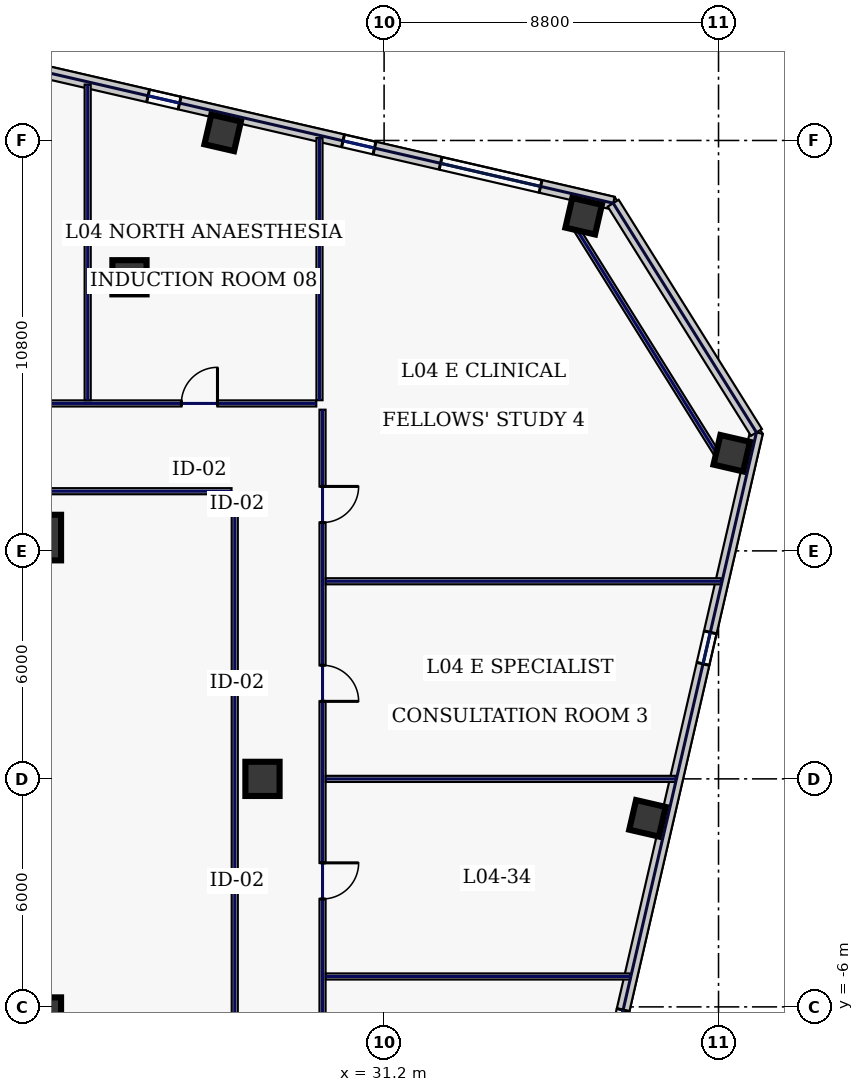
"""IFC4 building model, lengths in metres.
Left out: names, types, materials, properties, quantities, classifications, styles, units other than length and angle.
Written with IfcOpenShell. Run it as: python <this file> out.ifc"""

import sys

from ifc_helpers import new_model, si_unit, direction, frame, frame_2d, origin, origin_2d, place, context, subcontext, project, spatial, rectangle, hollow_rectangle, extrude, element, fill, save


model = new_model("IFC4")
c1 = context("Model", 3, precision=1e-05, world=origin(), true_north=direction((0.0, 1.0)))
c2 = subcontext(c1, "Body", "Model", "MODEL_VIEW")
j1 = project(units=[si_unit("LENGTHUNIT", "METRE"), si_unit("PLANEANGLEUNIT", "RADIAN")], contexts=[c1])
p1 = place(None, origin())
s1 = spatial("IfcSite", under=j1, at=p1, CompositionType="ELEMENT")
p2 = place(p1, origin())
s2 = spatial("IfcBuilding", under=s1, at=p2, CompositionType="ELEMENT")
p3 = place(p2, frame((0.0, 0.0, 23.4)))
s3 = spatial("IfcBuildingStorey", under=s2, at=p3, CompositionType="ELEMENT", Elevation=23.4)
for number, where, z_axis, x_axis in (
    (1, (22.1, -6.35, 0.0), (0.0, 0.0, 1.0), (1.0, 0.0, 0.0)),
    (2, (22.1, 6.35, 0.0), (0.0, 0.0, 1.0), (1.0, 0.0, 0.0)),
):
    element("IfcColumn", number, at=place(p3, frame(where, z_axis=z_axis, x_axis=x_axis)), inside=s3, PredefinedType="COLUMN", context=c2, shape_type="SweptSolid", body=[
        extrude(hollow_rectangle(XDim=1.2, YDim=1.2, WallThickness=0.05, at=origin_2d()), origin(), (0.0, 0.0, 1.0), 4.7),
    ])
for number, where, z_axis, x_axis in (
    (3, (24.5, 13.2, 0.0), (0.0, 0.0, 1.0), (1.0, 0.0, 0.0)),
    (4, (28.0, 0.0, 0.0), (0.0, 0.0, 1.0), (1.0, 0.0, 0.0)),
):
    element("IfcColumn", number, at=place(p3, frame(where, z_axis=z_axis, x_axis=x_axis)), inside=s3, PredefinedType="COLUMN", context=c2, shape_type="SweptSolid", body=[
        extrude(hollow_rectangle(XDim=0.9, YDim=0.9, WallThickness=0.04, at=origin_2d()), origin(), (0.0, 0.0, 1.0), 4.7),
    ])
for number, where, z_axis, x_axis in (
    (5, (36.451, 14.806, 0.0), (0.0, 0.0, 1.0), (0.974, -0.225, 0.0)),
    (6, (26.952, 16.999, 0.0), (0.0, 0.0, 1.0), (0.974, -0.225, 0.0)),
    (7, (38.13, -1.038, 0.0), (0.0, 0.0, 1.0), (0.974, -0.225, 0.0)),
    (8, (40.348, 8.57, 0.0), (0.0, 0.0, 1.0), (0.974, -0.225, 0.0)),
):
    element("IfcColumn", number, at=place(p3, frame(where, z_axis=z_axis, x_axis=x_axis)), inside=s3, PredefinedType="COLUMN", context=c2, shape_type="SweptSolid", body=[
        extrude(hollow_rectangle(XDim=0.8, YDim=0.8, WallThickness=0.036, at=origin_2d()), origin(), (0.0, 0.0, 1.0), 4.7),
    ])
p4 = place(p3, frame((37.229, 15.15, 0.0), z_axis=(0.0, 0.0, 1.0), x_axis=(-0.97436993772, 0.224951604723, 0.0)))
e9 = element("IfcWall", 9, at=p4, inside=s3, PredefinedType="STANDARD", context=c2, shape_type="SweptSolid", body=[
    extrude(rectangle(XDim=22.651, YDim=0.34, at=frame_2d((11.326, 0.0))), origin(), (0.0, 0.0, 1.0), 4.7),
])
p5 = place(p4, frame((16.195, 0.0, 0.9)))
e10 = element("IfcOpeningElement", 10, at=p5, cuts=e9, PredefinedType="OPENING", context=c2, shape_type="SweptSolid", body=[
    extrude(rectangle(XDim=2.7, YDim=2.2, at=frame_2d((1.35, 1.1))), frame((0.0, 0.18, 0.0), z_axis=(0.0, -1.0, 0.0), x_axis=(1.0, 0.0, 0.0)), (0.0, 0.0, 1.0), 0.36),
])
p6 = place(p4, frame((11.711, 0.0, 0.9)))
e11 = element("IfcOpeningElement", 11, at=p6, cuts=e9, PredefinedType="OPENING", context=c2, shape_type="SweptSolid", body=[
    extrude(rectangle(XDim=0.85, YDim=1.85, at=frame_2d((0.425, 0.925))), frame((0.0, 0.18, 0.0), z_axis=(0.0, -1.0, 0.0), x_axis=(1.0, 0.0, 0.0)), (0.0, 0.0, 1.0), 0.36),
])
p7 = place(p4, frame((6.447, 0.0, 0.9)))
e12 = element("IfcOpeningElement", 12, at=p7, cuts=e9, PredefinedType="OPENING", context=c2, shape_type="SweptSolid", body=[
    extrude(rectangle(XDim=0.85, YDim=1.85, at=frame_2d((0.425, 0.925))), frame((0.0, 0.18, 0.0), z_axis=(0.0, -1.0, 0.0), x_axis=(1.0, 0.0, 0.0)), (0.0, 0.0, 1.0), 0.36),
])
p8 = place(p4, frame((1.962, 0.0, 0.9)))
e13 = element("IfcOpeningElement", 13, at=p8, cuts=e9, PredefinedType="OPENING", context=c2, shape_type="SweptSolid", body=[
    extrude(rectangle(XDim=2.7, YDim=2.2, at=frame_2d((1.35, 1.1))), frame((0.0, 0.18, 0.0), z_axis=(0.0, -1.0, 0.0), x_axis=(1.0, 0.0, 0.0)), (0.0, 0.0, 1.0), 0.36),
])
p9 = place(p3, frame((31.82, -30.637, 0.0), z_axis=(0.0, 0.0, 1.0), x_axis=(0.224949969076, 0.974370315338, 0.0)))
e14 = element("IfcWall", 14, at=p9, inside=s3, PredefinedType="STANDARD", context=c2, shape_type="SweptSolid", body=[
    extrude(rectangle(XDim=40.8, YDim=0.34, at=frame_2d((20.4, 0.0))), origin(), (0.0, 0.0, 1.0), 4.7),
])
p10 = place(p9, frame((4.3, 0.0, 0.58)))
e15 = element("IfcOpeningElement", 15, at=p10, cuts=e14, PredefinedType="OPENING", context=c2, shape_type="SweptSolid", body=[
    extrude(rectangle(XDim=1.6, YDim=2.3, at=frame_2d((0.8, 1.15))), frame((0.0, 0.18, 0.0), z_axis=(0.0, -1.0, 0.0), x_axis=(1.0, 0.0, 0.0)), (0.0, 0.0, 1.0), 0.36),
])
p11 = place(p9, frame((14.5, 0.0, 0.58)))
e16 = element("IfcOpeningElement", 16, at=p11, cuts=e14, PredefinedType="OPENING", context=c2, shape_type="SweptSolid", body=[
    extrude(rectangle(XDim=1.6, YDim=2.3, at=frame_2d((0.8, 1.15))), frame((0.0, 0.18, 0.0), z_axis=(0.0, -1.0, 0.0), x_axis=(1.0, 0.0, 0.0)), (0.0, 0.0, 1.0), 0.36),
])
p12 = place(p9, frame((24.35, 0.0, 0.75)))
e17 = element("IfcOpeningElement", 17, at=p12, cuts=e14, PredefinedType="OPENING", context=c2, shape_type="SweptSolid", body=[
    extrude(rectangle(XDim=0.85, YDim=1.85, at=frame_2d((0.425, 0.925))), frame((0.0, 0.18, 0.0), z_axis=(0.0, -1.0, 0.0), x_axis=(1.0, 0.0, 0.0)), (0.0, 0.0, 1.0), 0.36),
])
p13 = place(p9, frame((34.55, 0.0, 0.75)))
e18 = element("IfcOpeningElement", 18, at=p13, cuts=e14, PredefinedType="OPENING", context=c2, shape_type="SweptSolid", body=[
    extrude(rectangle(XDim=0.85, YDim=1.85, at=frame_2d((0.425, 0.925))), frame((0.0, 0.18, 0.0), z_axis=(0.0, -1.0, 0.0), x_axis=(1.0, 0.0, 0.0)), (0.0, 0.0, 1.0), 0.36),
])
p14 = place(p3, frame((40.998, 9.117, 0.0), z_axis=(0.0, 0.0, 1.0), x_axis=(-0.529921811158, 0.848046504656, 0.0)))
e19 = element("IfcWall", 19, at=p14, inside=s3, PredefinedType="STANDARD", context=c2, shape_type="SweptSolid", body=[
    extrude(rectangle(XDim=7.113, YDim=0.34, at=frame_2d((3.557, 0.0))), origin(), (0.0, 0.0, 1.0), 4.7),
])
p15 = place(p3, frame((40.06, 8.389, 0.0), z_axis=(0.0, 0.0, 1.0), x_axis=(-0.529927317139, 0.848043064089, 0.0)))
e20 = element("IfcWall", 20, at=p15, inside=s3, PredefinedType="PARTITIONING", context=c2, shape_type="SweptSolid", body=[
    extrude(rectangle(XDim=7.354, YDim=0.16, at=frame_2d((3.677, 0.0))), origin(), (0.0, 0.0, 1.0), 4.7),
])
p16 = place(p3, frame((-29.415, 9.88, 0.0), z_axis=(0.0, 0.0, 1.0), x_axis=(1.0, 0.0, 0.0)))
e21 = element("IfcWall", 21, at=p16, inside=s3, PredefinedType="PARTITIONING", context=c2, shape_type="SweptSolid", body=[
    extrude(rectangle(XDim=58.83, YDim=0.16, at=frame_2d((29.415, 0.0))), origin(), (0.0, 0.0, 1.0), 4.7),
])
p17 = place(p16, frame((2.044, 0.0, 0.0)))
e22 = element("IfcOpeningElement", 22, at=p17, cuts=e21, PredefinedType="OPENING", context=c2, shape_type="SweptSolid", body=[
    extrude(rectangle(XDim=0.95, YDim=2.2, at=frame_2d((0.475, 1.1))), frame((0.0, 0.09, 0.0), z_axis=(0.0, -1.0, 0.0), x_axis=(1.0, 0.0, 0.0)), (0.0, 0.0, 1.0), 0.18),
])
p18 = place(p16, frame((7.5, 0.0, 0.0)))
e23 = element("IfcOpeningElement", 23, at=p18, cuts=e21, PredefinedType="OPENING", context=c2, shape_type="SweptSolid", body=[
    extrude(rectangle(XDim=0.95, YDim=2.2, at=frame_2d((0.475, 1.1))), frame((0.0, 0.09, 0.0), z_axis=(0.0, -1.0, 0.0), x_axis=(1.0, 0.0, 0.0)), (0.0, 0.0, 1.0), 0.18),
])
p19 = place(p16, frame((14.725, 0.0, 0.0)))
e24 = element("IfcOpeningElement", 24, at=p19, cuts=e21, PredefinedType="OPENING", context=c2, shape_type="SweptSolid", body=[
    extrude(rectangle(XDim=0.95, YDim=2.2, at=frame_2d((0.475, 1.1))), frame((0.0, 0.09, 0.0), z_axis=(0.0, -1.0, 0.0), x_axis=(1.0, 0.0, 0.0)), (0.0, 0.0, 1.0), 0.18),
])
p20 = place(p16, frame((23.025, 0.0, 0.0)))
e25 = element("IfcOpeningElement", 25, at=p20, cuts=e21, PredefinedType="OPENING", context=c2, shape_type="SweptSolid", body=[
    extrude(rectangle(XDim=0.95, YDim=2.2, at=frame_2d((0.475, 1.1))), frame((0.0, 0.09, 0.0), z_axis=(0.0, -1.0, 0.0), x_axis=(1.0, 0.0, 0.0)), (0.0, 0.0, 1.0), 0.18),
])
p21 = place(p16, frame((32.125, 0.0, 0.0)))
e26 = element("IfcOpeningElement", 26, at=p21, cuts=e21, PredefinedType="OPENING", context=c2, shape_type="SweptSolid", body=[
    extrude(rectangle(XDim=0.95, YDim=2.2, at=frame_2d((0.475, 1.1))), frame((0.0, 0.09, 0.0), z_axis=(0.0, -1.0, 0.0), x_axis=(1.0, 0.0, 0.0)), (0.0, 0.0, 1.0), 0.18),
])
p22 = place(p16, frame((41.025, 0.0, 0.0)))
e27 = element("IfcOpeningElement", 27, at=p22, cuts=e21, PredefinedType="OPENING", context=c2, shape_type="SweptSolid", body=[
    extrude(rectangle(XDim=0.95, YDim=2.2, at=frame_2d((0.475, 1.1))), frame((0.0, 0.09, 0.0), z_axis=(0.0, -1.0, 0.0), x_axis=(1.0, 0.0, 0.0)), (0.0, 0.0, 1.0), 0.18),
])
p23 = place(p16, frame((48.825, 0.0, 0.0)))
e28 = element("IfcOpeningElement", 28, at=p23, cuts=e21, PredefinedType="OPENING", context=c2, shape_type="SweptSolid", body=[
    extrude(rectangle(XDim=0.95, YDim=2.2, at=frame_2d((0.475, 1.1))), frame((0.0, 0.09, 0.0), z_axis=(0.0, -1.0, 0.0), x_axis=(1.0, 0.0, 0.0)), (0.0, 0.0, 1.0), 0.18),
])
p24 = place(p16, frame((55.281, 0.0, 0.0)))
e29 = element("IfcOpeningElement", 29, at=p24, cuts=e21, PredefinedType="OPENING", context=c2, shape_type="SweptSolid", body=[
    extrude(rectangle(XDim=0.95, YDim=2.2, at=frame_2d((0.475, 1.1))), frame((0.0, 0.09, 0.0), z_axis=(0.0, -1.0, 0.0), x_axis=(1.0, 0.0, 0.0)), (0.0, 0.0, 1.0), 0.18),
])
p25 = place(p3, frame((29.58, 9.715, 0.0), z_axis=(0.0, 0.0, 1.0), x_axis=(0.0, -1.0, 0.0)))
e30 = element("IfcWall", 30, at=p25, inside=s3, PredefinedType="PARTITIONING", context=c2, shape_type="SweptSolid", body=[
    extrude(rectangle(XDim=19.43, YDim=0.16, at=frame_2d((9.715, 0.0))), origin(), (0.0, 0.0, 1.0), 4.7),
])
p26 = place(p25, frame((16.631, 0.0, 0.0)))
e31 = element("IfcOpeningElement", 31, at=p26, cuts=e30, PredefinedType="OPENING", context=c2, shape_type="SweptSolid", body=[
    extrude(rectangle(XDim=0.95, YDim=2.2, at=frame_2d((0.475, 1.1))), frame((0.0, 0.09, 0.0), z_axis=(0.0, -1.0, 0.0), x_axis=(1.0, 0.0, 0.0)), (0.0, 0.0, 1.0), 0.18),
])
p27 = place(p25, frame((11.925, 0.0, 0.0)))
e32 = element("IfcOpeningElement", 32, at=p27, cuts=e30, PredefinedType="OPENING", context=c2, shape_type="SweptSolid", body=[
    extrude(rectangle(XDim=0.95, YDim=2.2, at=frame_2d((0.475, 1.1))), frame((0.0, 0.09, 0.0), z_axis=(0.0, -1.0, 0.0), x_axis=(1.0, 0.0, 0.0)), (0.0, 0.0, 1.0), 0.18),
])
p28 = place(p25, frame((6.725, 0.0, 0.0)))
e33 = element("IfcOpeningElement", 33, at=p28, cuts=e30, PredefinedType="OPENING", context=c2, shape_type="SweptSolid", body=[
    extrude(rectangle(XDim=0.95, YDim=2.2, at=frame_2d((0.475, 1.1))), frame((0.0, 0.09, 0.0), z_axis=(0.0, -1.0, 0.0), x_axis=(1.0, 0.0, 0.0)), (0.0, 0.0, 1.0), 0.18),
])
p29 = place(p25, frame((2.019, 0.0, 0.0)))
e34 = element("IfcOpeningElement", 34, at=p29, cuts=e30, PredefinedType="OPENING", context=c2, shape_type="SweptSolid", body=[
    extrude(rectangle(XDim=0.95, YDim=2.2, at=frame_2d((0.475, 1.1))), frame((0.0, 0.09, 0.0), z_axis=(0.0, -1.0, 0.0), x_axis=(1.0, 0.0, 0.0)), (0.0, 0.0, 1.0), 0.18),
])
p30 = place(p3, frame((27.185, 7.57, 0.0), z_axis=(0.0, 0.0, 1.0), x_axis=(-1.0, 0.0, 0.0)))
e35 = element("IfcWall", 35, at=p30, inside=s3, PredefinedType="PARTITIONING", context=c2, shape_type="SweptSolid", body=[
    extrude(rectangle(XDim=16.52, YDim=0.16, at=frame_2d((8.26, 0.0))), origin(), (0.0, 0.0, 1.0), 4.7),
])
p31 = place(p3, frame((27.27, -7.485, 0.0), z_axis=(0.0, 0.0, 1.0), x_axis=(0.0, 1.0, 0.0)))
e36 = element("IfcWall", 36, at=p31, inside=s3, PredefinedType="PARTITIONING", context=c2, shape_type="SweptSolid", body=[
    extrude(rectangle(XDim=14.97, YDim=0.16, at=frame_2d((7.485, 0.0))), origin(), (0.0, 0.0, 1.0), 4.7),
])
p32 = place(p3, frame((29.5, 9.965, 0.0), z_axis=(0.0, 0.0, 1.0), x_axis=(0.0, 1.0, 0.0)))
e37 = element("IfcWall", 37, at=p32, inside=s3, PredefinedType="PARTITIONING", context=c2, shape_type="SweptSolid", body=[
    extrude(rectangle(XDim=6.897, YDim=0.16, at=frame_2d((3.449, 0.0))), origin(), (0.0, 0.0, 1.0), 4.7),
])
p33 = place(p3, frame((23.4, 9.965, 0.0), z_axis=(0.0, 0.0, 1.0), x_axis=(0.0, 1.0, 0.0)))
e38 = element("IfcWall", 38, at=p33, inside=s3, PredefinedType="PARTITIONING", context=c2, shape_type="SweptSolid", body=[
    extrude(rectangle(XDim=8.306, YDim=0.16, at=frame_2d((4.153, 0.0))), origin(), (0.0, 0.0, 1.0), 4.7),
])
p34 = place(p3, frame((29.665, -5.2, 0.0), z_axis=(0.0, 0.0, 1.0), x_axis=(1.0, 0.0, 0.0)))
e39 = element("IfcWall", 39, at=p34, inside=s3, PredefinedType="PARTITIONING", context=c2, shape_type="SweptSolid", body=[
    extrude(rectangle(XDim=8.007, YDim=0.16, at=frame_2d((4.003, 0.0))), origin(), (0.0, 0.0, 1.0), 4.7),
])
p35 = place(p3, frame((29.665, 0.0, 0.0), z_axis=(0.0, 0.0, 1.0), x_axis=(1.0, 0.0, 0.0)))
e40 = element("IfcWall", 40, at=p35, inside=s3, PredefinedType="PARTITIONING", context=c2, shape_type="SweptSolid", body=[
    extrude(rectangle(XDim=9.208, YDim=0.16, at=frame_2d((4.604, 0.0))), origin(), (0.0, 0.0, 1.0), 4.195),
])
p36 = place(p3, frame((29.665, 5.2, 0.0), z_axis=(0.0, 0.0, 1.0), x_axis=(1.0, 0.0, 0.0)))
e41 = element("IfcWall", 41, at=p36, inside=s3, PredefinedType="PARTITIONING", context=c2, shape_type="SweptSolid", body=[
    extrude(rectangle(XDim=10.408, YDim=0.16, at=frame_2d((5.204, 0.0))), origin(), (0.0, 0.0, 1.0), 4.7),
])
p37 = place(p6, origin())
e42 = element("IfcWindow", 42, at=p37, inside=s3, PartitioningType="SINGLE_PANEL", PredefinedType="WINDOW", context=c2, shape_type="SweptSolid", body=[
    extrude(rectangle(XDim=0.85, YDim=1.85, at=frame_2d((0.425, 0.925))), frame((0.0, 0.03, 0.0), z_axis=(0.0, -1.0, 0.0), x_axis=(1.0, 0.0, 0.0)), (0.0, 0.0, 1.0), 0.06),
])
fill(e11, e42)
p38 = place(p7, origin())
e43 = element("IfcWindow", 43, at=p38, inside=s3, PartitioningType="SINGLE_PANEL", PredefinedType="WINDOW", context=c2, shape_type="SweptSolid", body=[
    extrude(rectangle(XDim=0.85, YDim=1.85, at=frame_2d((0.425, 0.925))), frame((0.0, 0.03, 0.0), z_axis=(0.0, -1.0, 0.0), x_axis=(1.0, 0.0, 0.0)), (0.0, 0.0, 1.0), 0.06),
])
fill(e12, e43)
p39 = place(p8, origin())
e44 = element("IfcWindow", 44, at=p39, inside=s3, PartitioningType="SINGLE_PANEL", PredefinedType="WINDOW", context=c2, shape_type="SweptSolid", body=[
    extrude(rectangle(XDim=2.7, YDim=2.2, at=frame_2d((1.35, 1.1))), frame((0.0, 0.03, 0.0), z_axis=(0.0, -1.0, 0.0), x_axis=(1.0, 0.0, 0.0)), (0.0, 0.0, 1.0), 0.06),
])
fill(e13, e44)
p40 = place(p12, origin())
e45 = element("IfcWindow", 45, at=p40, inside=s3, PartitioningType="SINGLE_PANEL", PredefinedType="WINDOW", context=c2, shape_type="SweptSolid", body=[
    extrude(rectangle(XDim=0.85, YDim=1.85, at=frame_2d((0.425, 0.925))), frame((0.0, 0.03, 0.0), z_axis=(0.0, -1.0, 0.0), x_axis=(1.0, 0.0, 0.0)), (0.0, 0.0, 1.0), 0.06),
])
fill(e17, e45)
p41 = place(p13, origin())
e46 = element("IfcWindow", 46, at=p41, inside=s3, PartitioningType="SINGLE_PANEL", PredefinedType="WINDOW", context=c2, shape_type="SweptSolid", body=[
    extrude(rectangle(XDim=0.85, YDim=1.85, at=frame_2d((0.425, 0.925))), frame((0.0, 0.03, 0.0), z_axis=(0.0, -1.0, 0.0), x_axis=(1.0, 0.0, 0.0)), (0.0, 0.0, 1.0), 0.06),
])
fill(e18, e46)
p42 = place(p24, origin())
e47 = element("IfcDoor", 47, at=p42, inside=s3, OperationType="SINGLE_SWING_RIGHT", PredefinedType="DOOR", context=c2, shape_type="SweptSolid", body=[
    extrude(rectangle(XDim=0.95, YDim=2.2, at=frame_2d((0.475, 1.1))), frame((0.0, 0.025, 0.0), z_axis=(0.0, -1.0, 0.0), x_axis=(1.0, 0.0, 0.0)), (0.0, 0.0, 1.0), 0.05),
])
fill(e29, e47)
p43 = place(p27, origin())
e48 = element("IfcDoor", 48, at=p43, inside=s3, OperationType="SINGLE_SWING_LEFT", PredefinedType="DOOR", context=c2, shape_type="SweptSolid", body=[
    extrude(rectangle(XDim=0.95, YDim=2.2, at=frame_2d((0.475, 1.1))), frame((0.0, 0.025, 0.0), z_axis=(0.0, -1.0, 0.0), x_axis=(1.0, 0.0, 0.0)), (0.0, 0.0, 1.0), 0.05),
])
fill(e32, e48)
p44 = place(p28, origin())
e49 = element("IfcDoor", 49, at=p44, inside=s3, OperationType="SINGLE_SWING_RIGHT", PredefinedType="DOOR", context=c2, shape_type="SweptSolid", body=[
    extrude(rectangle(XDim=0.95, YDim=2.2, at=frame_2d((0.475, 1.1))), frame((0.0, 0.025, 0.0), z_axis=(0.0, -1.0, 0.0), x_axis=(1.0, 0.0, 0.0)), (0.0, 0.0, 1.0), 0.05),
])
fill(e33, e49)
p45 = place(p29, origin())
e50 = element("IfcDoor", 50, at=p45, inside=s3, OperationType="SINGLE_SWING_LEFT", PredefinedType="DOOR", context=c2, shape_type="SweptSolid", body=[
    extrude(rectangle(XDim=0.95, YDim=2.2, at=frame_2d((0.475, 1.1))), frame((0.0, 0.025, 0.0), z_axis=(0.0, -1.0, 0.0), x_axis=(1.0, 0.0, 0.0)), (0.0, 0.0, 1.0), 0.05),
])
fill(e34, e50)
save(model, sys.argv[1])
